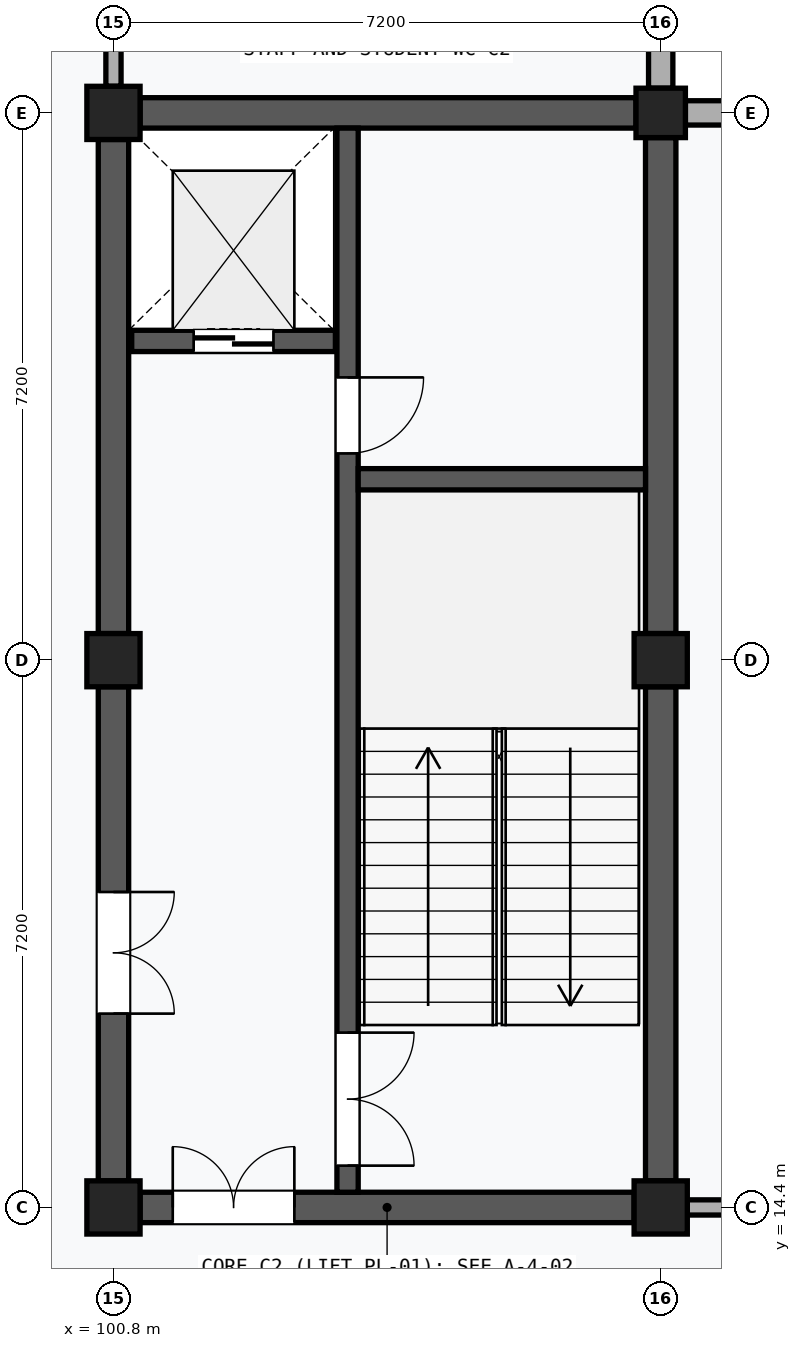
"""IFC4 building model, lengths in metres.
Left out: names, types, materials, properties, quantities, classifications, styles, units other than length and angle.
Written with IfcOpenShell. Run it as: python <this file> out.ifc"""

import sys

from ifc_helpers import new_model, si_unit, direction, frame, frame_2d, origin, origin_2d, place, context, subcontext, project, spatial, rectangle, extrude, element, fill, save


model = new_model("IFC4")
c1 = context("Model", 3, precision=1e-05, world=origin(), true_north=direction((0.0, 1.0)))
c2 = subcontext(c1, "Body", "Model", "MODEL_VIEW")
j1 = project(units=[si_unit("LENGTHUNIT", "METRE"), si_unit("PLANEANGLEUNIT", "RADIAN")], contexts=[c1])
p1 = place(None, origin())
s1 = spatial("IfcSite", under=j1, at=p1, CompositionType="ELEMENT")
p2 = place(p1, origin())
s2 = spatial("IfcBuilding", under=s1, at=p2, CompositionType="ELEMENT")
p3 = place(p2, frame((0.0, 0.0, 30.6)))
s3 = spatial("IfcBuildingStorey", under=s2, at=p3, CompositionType="ELEMENT", Elevation=30.6)
for number, where, z_axis, x_axis in (
    (1, (100.8, 14.4, 0.0), (0.0, 0.0, 1.0), (1.0, 0.0, 0.0)),
    (2, (100.8, 21.6, 0.0), (0.0, 0.0, 1.0), (1.0, 0.0, 0.0)),
    (3, (100.8, 28.8, 0.0), (0.0, 0.0, 1.0), (1.0, 0.0, 0.0)),
    (4, (108.0, 14.4, 0.0), (0.0, 0.0, 1.0), (1.0, 0.0, 0.0)),
    (5, (108.0, 21.6, 0.0), (0.0, 0.0, 1.0), (1.0, 0.0, 0.0)),
):
    element("IfcColumn", number, at=place(p3, frame(where, z_axis=z_axis, x_axis=x_axis)), inside=s3, PredefinedType="COLUMN", context=c2, shape_type="SweptSolid", body=[
        extrude(rectangle(XDim=0.7, YDim=0.7, at=origin_2d()), origin(), (0.0, 0.0, 1.0), 4.2),
    ])
p4 = place(p3, frame((108.0, 28.8, 0.0), z_axis=(0.0, 0.0, 1.0), x_axis=(1.0, 0.0, 0.0)))
e6 = element("IfcColumn", 6, at=p4, inside=s3, PredefinedType="COLUMN", context=c2, shape_type="SweptSolid", body=[
    extrude(rectangle(XDim=0.65, YDim=0.65, at=origin_2d()), origin(), (0.0, 0.0, 1.0), 4.2),
])
p5 = place(p3, frame((108.0, 29.125, 0.0), z_axis=(0.0, 0.0, 1.0), x_axis=(0.0, 1.0, 0.0)))
e7 = element("IfcWall", 7, at=p5, inside=s3, PredefinedType="SOLIDWALL", context=c2, shape_type="SweptSolid", body=[
    extrude(rectangle(XDim=6.5, YDim=0.32, at=frame_2d((3.25, 0.0))), origin(), (0.0, 0.0, 1.0), 3.25),
])
p6 = place(p5, frame((2.15, 0.0, 1.1)))
e8 = element("IfcOpeningElement", 8, at=p6, cuts=e7, PredefinedType="OPENING", context=c2, shape_type="SweptSolid", body=[
    extrude(rectangle(XDim=2.2, YDim=1.5, at=frame_2d((1.1, 0.75))), frame((0.0, 0.172, 0.0), z_axis=(0.0, -1.0, 0.0), x_axis=(1.0, 0.0, 0.0)), (0.0, 0.0, 1.0), 0.344),
])
p7 = place(p3, frame((108.325, 28.8, 0.0), z_axis=(0.0, 0.0, 1.0), x_axis=(1.0, 0.0, 0.0)))
e9 = element("IfcWall", 9, at=p7, inside=s3, PredefinedType="SOLIDWALL", context=c2, shape_type="SweptSolid", body=[
    extrude(rectangle(XDim=6.625, YDim=0.32, at=frame_2d((3.312, 0.0))), origin(), (0.0, 0.0, 1.0), 3.25),
])
p8 = place(p7, frame((2.212, 0.0, 1.1)))
e10 = element("IfcOpeningElement", 10, at=p8, cuts=e9, PredefinedType="OPENING", context=c2, shape_type="SweptSolid", body=[
    extrude(rectangle(XDim=2.2, YDim=1.5, at=frame_2d((1.1, 0.75))), frame((0.0, 0.172, 0.0), z_axis=(0.0, -1.0, 0.0), x_axis=(1.0, 0.0, 0.0)), (0.0, 0.0, 1.0), 0.344),
])
p9 = place(p3, frame((100.8, 14.75, 0.0), z_axis=(0.0, 0.0, 1.0), x_axis=(0.0, 1.0, 0.0)))
e11 = element("IfcWall", 11, at=p9, inside=s3, PredefinedType="SHEAR", context=c2, shape_type="SweptSolid", body=[
    extrude(rectangle(XDim=6.5, YDim=0.4, at=frame_2d((3.25, 0.0))), origin(), (0.0, 0.0, 1.0), 3.11),
])
p10 = place(p9, frame((2.2, 0.0, 0.0)))
e12 = element("IfcOpeningElement", 12, at=p10, cuts=e11, PredefinedType="OPENING", context=c2, shape_type="SweptSolid", body=[
    extrude(rectangle(XDim=1.6, YDim=2.2, at=frame_2d((0.8, 1.1))), frame((0.0, 0.212, 0.0), z_axis=(0.0, -1.0, 0.0), x_axis=(1.0, 0.0, 0.0)), (0.0, 0.0, 1.0), 0.424),
])
for number, where, z_axis, x_axis in (
    (13, (100.8, 21.95, 0.0), (0.0, 0.0, 1.0), (0.0, 1.0, 0.0)),
    (14, (108.0, 14.75, 0.0), (0.0, 0.0, 1.0), (0.0, 1.0, 0.0)),
):
    element("IfcWall", number, at=place(p3, frame(where, z_axis=z_axis, x_axis=x_axis)), inside=s3, PredefinedType="SHEAR", context=c2, shape_type="SweptSolid", body=[
        extrude(rectangle(XDim=6.5, YDim=0.4, at=frame_2d((3.25, 0.0))), origin(), (0.0, 0.0, 1.0), 3.11),
    ])
p11 = place(p3, frame((108.0, 21.95, 0.0), z_axis=(0.0, 0.0, 1.0), x_axis=(0.0, 1.0, 0.0)))
e15 = element("IfcWall", 15, at=p11, inside=s3, PredefinedType="SHEAR", context=c2, shape_type="SweptSolid", body=[
    extrude(rectangle(XDim=6.525, YDim=0.4, at=frame_2d((3.263, 0.0))), origin(), (0.0, 0.0, 1.0), 3.11),
])
p12 = place(p3, frame((101.15, 14.4, 0.0), z_axis=(0.0, 0.0, 1.0), x_axis=(1.0, 0.0, 0.0)))
e16 = element("IfcWall", 16, at=p12, inside=s3, PredefinedType="SHEAR", context=c2, shape_type="SweptSolid", body=[
    extrude(rectangle(XDim=6.5, YDim=0.4, at=frame_2d((3.25, 0.0))), origin(), (0.0, 0.0, 1.0), 3.18),
])
p13 = place(p12, frame((0.43, 0.0, 0.0)))
e17 = element("IfcOpeningElement", 17, at=p13, cuts=e16, PredefinedType="OPENING", context=c2, shape_type="SweptSolid", body=[
    extrude(rectangle(XDim=1.6, YDim=2.2, at=frame_2d((0.8, 1.1))), frame((0.0, 0.212, 0.0), z_axis=(0.0, -1.0, 0.0), x_axis=(1.0, 0.0, 0.0)), (0.0, 0.0, 1.0), 0.424),
])
p14 = place(p3, frame((101.15, 28.8, 0.0), z_axis=(0.0, 0.0, 1.0), x_axis=(1.0, 0.0, 0.0)))
e18 = element("IfcWall", 18, at=p14, inside=s3, PredefinedType="SHEAR", context=c2, shape_type="SweptSolid", body=[
    extrude(rectangle(XDim=6.525, YDim=0.4, at=frame_2d((3.263, 0.0))), origin(), (0.0, 0.0, 1.0), 3.11),
])
p15 = place(p3, frame((103.88, 14.6, 0.0), z_axis=(0.0, 0.0, 1.0), x_axis=(0.0, 1.0, 0.0)))
e19 = element("IfcWall", 19, at=p15, inside=s3, PredefinedType="SHEAR", context=c2, shape_type="SweptSolid", body=[
    extrude(rectangle(XDim=14.0, YDim=0.28, at=frame_2d((7.0, 0.0))), origin(), (0.0, 0.0, 1.0), 3.88),
])
p16 = place(p15, frame((0.35, 0.0, 0.0)))
e20 = element("IfcOpeningElement", 20, at=p16, cuts=e19, PredefinedType="OPENING", context=c2, shape_type="SweptSolid", body=[
    extrude(rectangle(XDim=1.75, YDim=2.15, at=frame_2d((0.875, 1.075))), frame((0.0, 0.152, 0.0), z_axis=(0.0, -1.0, 0.0), x_axis=(1.0, 0.0, 0.0)), (0.0, 0.0, 1.0), 0.304),
])
p17 = place(p15, frame((9.72, 0.0, 0.0)))
e21 = element("IfcOpeningElement", 21, at=p17, cuts=e19, PredefinedType="OPENING", context=c2, shape_type="SweptSolid", body=[
    extrude(rectangle(XDim=1.0, YDim=2.15, at=frame_2d((0.5, 1.075))), frame((0.0, 0.152, 0.0), z_axis=(0.0, -1.0, 0.0), x_axis=(1.0, 0.0, 0.0)), (0.0, 0.0, 1.0), 0.304),
])
p18 = place(p3, frame((104.02, 23.98, 0.0), z_axis=(0.0, 0.0, 1.0), x_axis=(1.0, 0.0, 0.0)))
e22 = element("IfcWall", 22, at=p18, inside=s3, PredefinedType="SHEAR", context=c2, shape_type="SweptSolid", body=[
    extrude(rectangle(XDim=3.78, YDim=0.28, at=frame_2d((1.89, 0.0))), origin(), (0.0, 0.0, 1.0), 3.88),
])
p19 = place(p3, frame((101.04, 25.8, 0.0), z_axis=(0.0, 0.0, 1.0), x_axis=(1.0, 0.0, 0.0)))
e23 = element("IfcWall", 23, at=p19, inside=s3, PredefinedType="SHEAR", context=c2, shape_type="SweptSolid", body=[
    extrude(rectangle(XDim=2.68, YDim=0.28, at=frame_2d((1.34, 0.0))), origin(), (0.0, 0.0, 1.0), 3.88),
])
p20 = place(p19, frame((0.815, 0.0, 0.0)))
e24 = element("IfcOpeningElement", 24, at=p20, cuts=e23, PredefinedType="OPENING", context=c2, shape_type="SweptSolid", body=[
    extrude(rectangle(XDim=1.05, YDim=2.2, at=frame_2d((0.525, 1.1))), frame((0.0, 0.152, 0.0), z_axis=(0.0, -1.0, 0.0), x_axis=(1.0, 0.0, 0.0)), (0.0, 0.0, 1.0), 0.304),
])
p21 = place(p3, frame((108.35, 14.4, 0.0), z_axis=(0.0, 0.0, 1.0), x_axis=(1.0, 0.0, 0.0)))
e25 = element("IfcWall", 25, at=p21, inside=s3, PredefinedType="PARTITIONING", context=c2, shape_type="SweptSolid", body=[
    extrude(rectangle(XDim=6.5, YDim=0.2, at=frame_2d((3.25, 0.0))), origin(), (0.0, 0.0, 1.0), 3.11),
])
p22 = place(p21, frame((2.72, 0.0, 0.0)))
e26 = element("IfcOpeningElement", 26, at=p22, cuts=e25, PredefinedType="OPENING", context=c2, shape_type="SweptSolid", body=[
    extrude(rectangle(XDim=1.06, YDim=2.16, at=frame_2d((0.53, 1.08))), frame((0.0, 0.112, 0.0), z_axis=(0.0, -1.0, 0.0), x_axis=(1.0, 0.0, 0.0)), (0.0, 0.0, 1.0), 0.224),
])
p23 = place(p3, frame((100.8, 29.15, 0.0), z_axis=(0.0, 0.0, 1.0), x_axis=(0.0, 1.0, 0.0)))
e27 = element("IfcWall", 27, at=p23, inside=s3, PredefinedType="PARTITIONING", context=c2, shape_type="SweptSolid", body=[
    extrude(rectangle(XDim=6.5, YDim=0.2, at=frame_2d((3.25, 0.0))), origin(), (0.0, 0.0, 1.0), 3.11),
])
p24 = place(p23, frame((2.69, 0.0, 0.0)))
e28 = element("IfcOpeningElement", 28, at=p24, cuts=e27, PredefinedType="OPENING", context=c2, shape_type="SweptSolid", body=[
    extrude(rectangle(XDim=1.12, YDim=2.2, at=frame_2d((0.56, 1.1))), frame((0.0, 0.112, 0.0), z_axis=(0.0, -1.0, 0.0), x_axis=(1.0, 0.0, 0.0)), (0.0, 0.0, 1.0), 0.224),
])
p25 = place(p10, frame((1.6, 0.0, 0.0), z_axis=(0.0, 0.0, 1.0), x_axis=(-1.0, 0.0, 0.0)))
e29 = element("IfcDoor", 29, at=p25, inside=s3, OperationType="DOUBLE_DOOR_SINGLE_SWING", PredefinedType="DOOR", context=c2, shape_type="SweptSolid", body=[
    extrude(rectangle(XDim=1.6, YDim=2.2, at=frame_2d((0.8, 1.1))), frame((0.0, 0.025, 0.0), z_axis=(0.0, -1.0, 0.0), x_axis=(1.0, 0.0, 0.0)), (0.0, 0.0, 1.0), 0.05),
])
fill(e12, e29)
p26 = place(p13, origin())
e30 = element("IfcDoor", 30, at=p26, inside=s3, OperationType="DOUBLE_DOOR_SINGLE_SWING", PredefinedType="DOOR", context=c2, shape_type="SweptSolid", body=[
    extrude(rectangle(XDim=1.6, YDim=2.2, at=frame_2d((0.8, 1.1))), frame((0.0, 0.025, 0.0), z_axis=(0.0, -1.0, 0.0), x_axis=(1.0, 0.0, 0.0)), (0.0, 0.0, 1.0), 0.05),
])
fill(e17, e30)
p27 = place(p16, frame((1.75, 0.0, 0.0), z_axis=(0.0, 0.0, 1.0), x_axis=(-1.0, 0.0, 0.0)))
e31 = element("IfcDoor", 31, at=p27, inside=s3, OperationType="DOUBLE_DOOR_SINGLE_SWING", PredefinedType="DOOR", context=c2, shape_type="SweptSolid", body=[
    extrude(rectangle(XDim=1.75, YDim=2.15, at=frame_2d((0.875, 1.075))), frame((0.0, 0.025, 0.0), z_axis=(0.0, -1.0, 0.0), x_axis=(1.0, 0.0, 0.0)), (0.0, 0.0, 1.0), 0.05),
])
fill(e20, e31)
p28 = place(p17, frame((1.0, 0.0, 0.0), z_axis=(0.0, 0.0, 1.0), x_axis=(-1.0, 0.0, 0.0)))
e32 = element("IfcDoor", 32, at=p28, inside=s3, OperationType="SINGLE_SWING_LEFT", PredefinedType="DOOR", context=c2, shape_type="SweptSolid", body=[
    extrude(rectangle(XDim=1.0, YDim=2.15, at=frame_2d((0.5, 1.075))), frame((0.0, 0.025, 0.0), z_axis=(0.0, -1.0, 0.0), x_axis=(1.0, 0.0, 0.0)), (0.0, 0.0, 1.0), 0.05),
])
fill(e21, e32)
p29 = place(p20, frame((1.05, 0.0, 0.0), z_axis=(0.0, 0.0, 1.0), x_axis=(-1.0, 0.0, 0.0)))
e33 = element("IfcDoor", 33, at=p29, inside=s3, OperationType="DOUBLE_DOOR_SLIDING", PredefinedType="DOOR", context=c2, shape_type="SweptSolid", body=[
    extrude(rectangle(XDim=1.05, YDim=2.2, at=frame_2d((0.525, 1.1))), frame((0.0, 0.025, 0.0), z_axis=(0.0, -1.0, 0.0), x_axis=(1.0, 0.0, 0.0)), (0.0, 0.0, 1.0), 0.05),
])
fill(e24, e33)
save(model, sys.argv[1])
